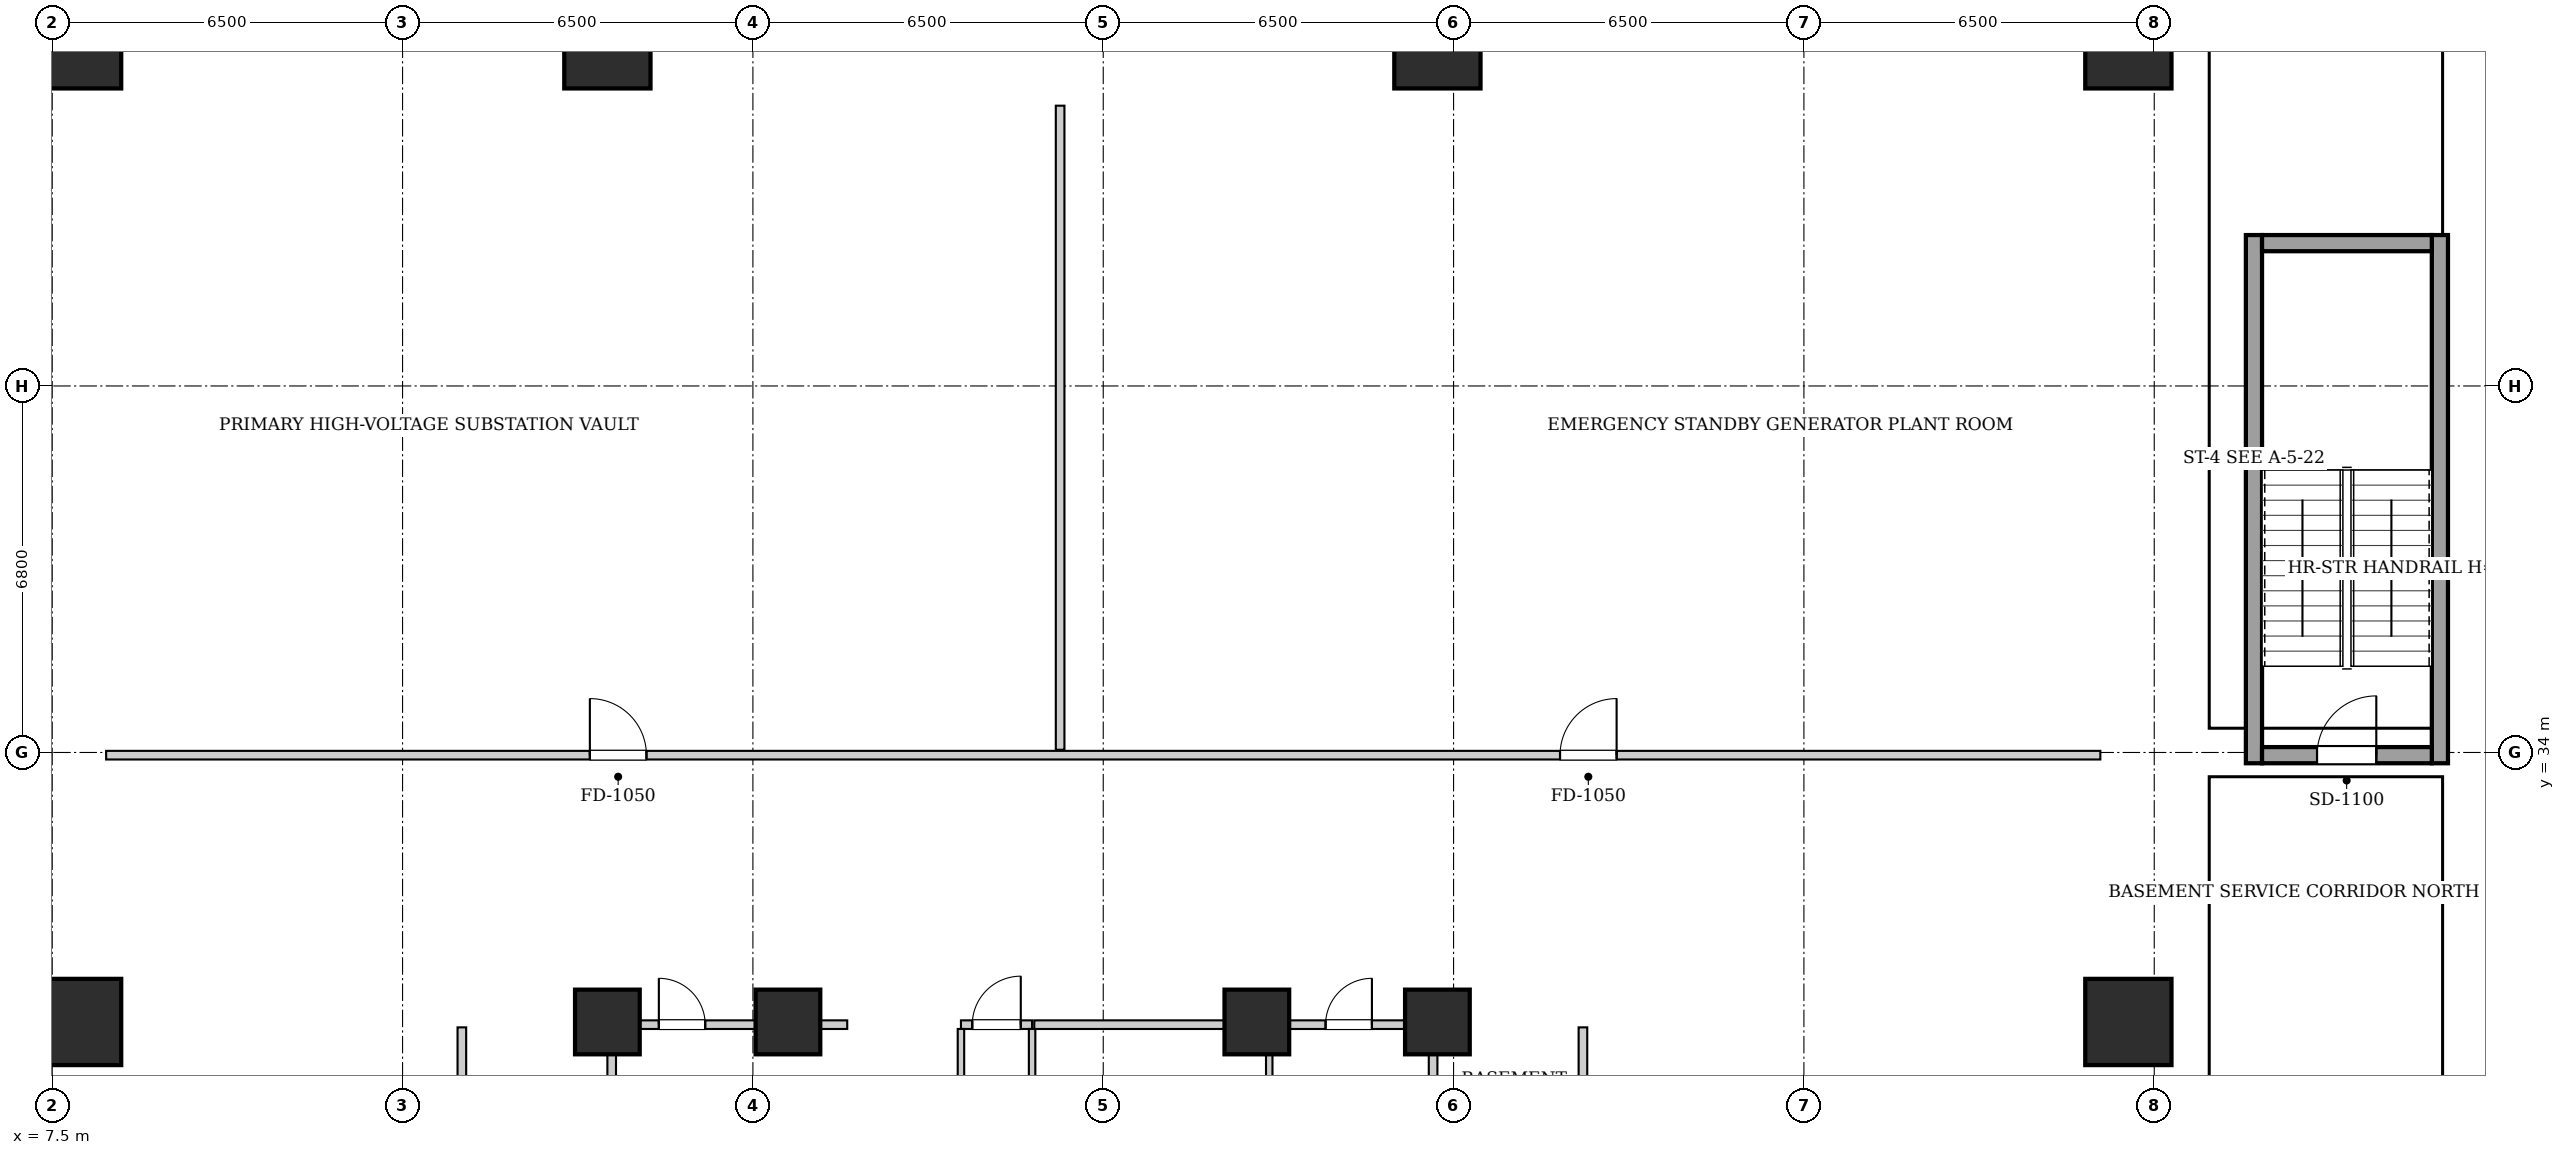
"""IFC4 building model, lengths in metres.
Left out: names, types, materials, properties, quantities, classifications, styles, units other than length and angle.
Written with IfcOpenShell. Run it as: python <this file> out.ifc"""

import sys

from ifc_helpers import new_model, si_unit, direction, frame, frame_2d, origin, origin_2d, place, context, subcontext, project, spatial, rectangle, extrude, element, fill, save


model = new_model("IFC4")
c1 = context("Model", 3, precision=1e-05, world=origin(), true_north=direction((0.0, 1.0)))
c2 = subcontext(c1, "Body", "Model", "MODEL_VIEW")
j1 = project(units=[si_unit("LENGTHUNIT", "METRE"), si_unit("PLANEANGLEUNIT", "RADIAN")], contexts=[c1])
p1 = place(None, origin())
s1 = spatial("IfcSite", under=j1, at=p1, CompositionType="ELEMENT")
p2 = place(p1, origin())
s2 = spatial("IfcBuilding", under=s1, at=p2, CompositionType="ELEMENT")
p3 = place(p2, frame((0.0, 0.0, -9.6)))
s3 = spatial("IfcBuildingStorey", under=s2, at=p3, CompositionType="ELEMENT", Elevation=-9.6)
for number, where, z_axis, x_axis in (
    (1, (7.98, 29.0, 0.0), (0.0, 0.0, 1.0), (1.0, 0.0, 0.0)),
    (2, (7.98, 47.12, 0.0), (0.0, 0.0, 1.0), (1.0, 0.0, 0.0)),
    (3, (46.02, 29.0, 0.0), (0.0, 0.0, 1.0), (1.0, 0.0, 0.0)),
    (4, (46.02, 47.12, 0.0), (0.0, 0.0, 1.0), (1.0, 0.0, 0.0)),
    (5, (17.8, 47.12, 0.0), (0.0, 0.0, 1.0), (1.0, 0.0, 0.0)),
    (6, (33.2, 47.12, 0.0), (0.0, 0.0, 1.0), (1.0, 0.0, 0.0)),
):
    element("IfcColumn", number, at=place(p3, frame(where, z_axis=z_axis, x_axis=x_axis)), inside=s3, PredefinedType="COLUMN", context=c2, shape_type="SweptSolid", body=[
        extrude(rectangle(XDim=1.6, YDim=1.6, at=origin_2d()), origin(), (0.0, 0.0, 1.0), 4.8),
    ])
for number, where, z_axis, x_axis in (
    (7, (17.8, 29.0, 0.0), (0.0, 0.0, 1.0), (1.0, 0.0, 0.0)),
    (8, (21.15, 29.0, 0.0), (0.0, 0.0, 1.0), (1.0, 0.0, 0.0)),
    (9, (29.85, 29.0, 0.0), (0.0, 0.0, 1.0), (1.0, 0.0, 0.0)),
    (10, (33.2, 29.0, 0.0), (0.0, 0.0, 1.0), (1.0, 0.0, 0.0)),
):
    element("IfcColumn", number, at=place(p3, frame(where, z_axis=z_axis, x_axis=x_axis)), inside=s3, PredefinedType="COLUMN", context=c2, shape_type="SweptSolid", body=[
        extrude(rectangle(XDim=1.2, YDim=1.2, at=origin_2d()), origin(), (0.0, 0.0, 1.0), 4.8),
    ])
for number, where, z_axis, x_axis in (
    (11, (48.35, 33.8, 0.0), (0.0, 0.0, 1.0), (0.0, 1.0, 0.0)),
    (12, (51.8, 33.8, 0.0), (0.0, 0.0, 1.0), (0.0, 1.0, 0.0)),
):
    element("IfcWall", number, at=place(p3, frame(where, z_axis=z_axis, x_axis=x_axis)), inside=s3, PredefinedType="SHEAR", context=c2, shape_type="SweptSolid", body=[
        extrude(rectangle(XDim=9.8, YDim=0.3, at=frame_2d((4.9, 0.0))), origin(), (0.0, 0.0, 1.0), 4.48),
    ])
p4 = place(p3, frame((48.5, 43.45, 0.0), z_axis=(0.0, 0.0, 1.0), x_axis=(1.0, 0.0, 0.0)))
e13 = element("IfcWall", 13, at=p4, inside=s3, PredefinedType="SHEAR", context=c2, shape_type="SweptSolid", body=[
    extrude(rectangle(XDim=3.15, YDim=0.3, at=frame_2d((1.575, 0.0))), origin(), (0.0, 0.0, 1.0), 4.48),
])
p5 = place(p3, frame((48.5, 33.95, 0.0), z_axis=(0.0, 0.0, 1.0), x_axis=(1.0, 0.0, 0.0)))
e14 = element("IfcWall", 14, at=p5, inside=s3, PredefinedType="SHEAR", context=c2, shape_type="SweptSolid", body=[
    extrude(rectangle(XDim=3.15, YDim=0.3, at=frame_2d((1.575, 0.0))), origin(), (0.0, 0.0, 1.0), 4.48),
])
p6 = place(p5, frame((1.02, 0.0, 0.0)))
e15 = element("IfcOpeningElement", 15, at=p6, cuts=e14, PredefinedType="OPENING", context=c2, shape_type="SweptSolid", body=[
    extrude(rectangle(XDim=1.1, YDim=2.05, at=frame_2d((0.55, 1.025))), frame((0.0, 0.16, 0.0), z_axis=(0.0, -1.0, 0.0), x_axis=(1.0, 0.0, 0.0)), (0.0, 0.0, 1.0), 0.32),
])
for number, where, z_axis, x_axis in (
    (16, (17.88, 24.12, 0.0), (0.0, 0.0, 1.0), (0.0, 1.0, 0.0)),
    (17, (33.12, 24.12, 0.0), (0.0, 0.0, 1.0), (0.0, 1.0, 0.0)),
):
    element("IfcWall", number, at=place(p3, frame(where, z_axis=z_axis, x_axis=x_axis)), inside=s3, PredefinedType="PARTITIONING", context=c2, shape_type="SweptSolid", body=[
        extrude(rectangle(XDim=4.76, YDim=0.16, at=frame_2d((2.38, 0.0))), origin(), (0.0, 0.0, 1.0), 4.48),
    ])
p7 = place(p3, frame((24.36, 28.95, 0.0), z_axis=(0.0, 0.0, 1.0), x_axis=(1.0, 0.0, 0.0)))
e18 = element("IfcWall", 18, at=p7, inside=s3, PredefinedType="PARTITIONING", context=c2, shape_type="SweptSolid", body=[
    extrude(rectangle(XDim=1.32, YDim=0.16, at=frame_2d((0.66, 0.0))), origin(), (0.0, 0.0, 1.0), 4.48),
])
p8 = place(p7, frame((0.21, 0.0, 0.0)))
e19 = element("IfcOpeningElement", 19, at=p8, cuts=e18, PredefinedType="OPENING", context=c2, shape_type="SweptSolid", body=[
    extrude(rectangle(XDim=0.9, YDim=2.05, at=frame_2d((0.45, 1.025))), frame((0.0, 0.09, 0.0), z_axis=(0.0, -1.0, 0.0), x_axis=(1.0, 0.0, 0.0)), (0.0, 0.0, 1.0), 0.18),
])
p9 = place(p3, frame((17.96, 28.95, 0.0), z_axis=(0.0, 0.0, 1.0), x_axis=(1.0, 0.0, 0.0)))
e20 = element("IfcWall", 20, at=p9, inside=s3, PredefinedType="PARTITIONING", context=c2, shape_type="SweptSolid", body=[
    extrude(rectangle(XDim=4.29, YDim=0.16, at=frame_2d((2.145, 0.0))), origin(), (0.0, 0.0, 1.0), 4.48),
])
p10 = place(p9, frame((0.795, 0.0, 0.0)))
e21 = element("IfcOpeningElement", 21, at=p10, cuts=e20, PredefinedType="OPENING", context=c2, shape_type="SweptSolid", body=[
    extrude(rectangle(XDim=0.86, YDim=2.05, at=frame_2d((0.43, 1.025))), frame((0.0, 0.09, 0.0), z_axis=(0.0, -1.0, 0.0), x_axis=(1.0, 0.0, 0.0)), (0.0, 0.0, 1.0), 0.18),
])
for number, where, z_axis, x_axis in (
    (22, (24.36, 26.6, 0.0), (0.0, 0.0, 1.0), (0.0, 1.0, 0.0)),
    (23, (25.68, 26.6, 0.0), (0.0, 0.0, 1.0), (0.0, 1.0, 0.0)),
):
    element("IfcWall", number, at=place(p3, frame(where, z_axis=z_axis, x_axis=x_axis)), inside=s3, PredefinedType="PARTITIONING", context=c2, shape_type="SweptSolid", body=[
        extrude(rectangle(XDim=2.27, YDim=0.12, at=frame_2d((1.135, 0.0))), origin(), (0.0, 0.0, 1.0), 4.48),
    ])
p11 = place(p3, frame((30.08, 26.18, 0.0), z_axis=(0.0, 0.0, 1.0), x_axis=(0.0, 1.0, 0.0)))
e24 = element("IfcWall", 24, at=p11, inside=s3, PredefinedType="PARTITIONING", context=c2, shape_type="SweptSolid", body=[
    extrude(rectangle(XDim=2.68, YDim=0.12, at=frame_2d((1.34, 0.0))), origin(), (0.0, 0.0, 1.0), 4.48),
])
p12 = place(p3, frame((30.08, 28.95, 0.0), z_axis=(0.0, 0.0, 1.0), x_axis=(1.0, 0.0, 0.0)))
e25 = element("IfcWall", 25, at=p12, inside=s3, PredefinedType="PARTITIONING", context=c2, shape_type="SweptSolid", body=[
    extrude(rectangle(XDim=2.96, YDim=0.16, at=frame_2d((1.48, 0.0))), origin(), (0.0, 0.0, 1.0), 4.48),
])
p13 = place(p12, frame((1.045, 0.0, 0.0)))
e26 = element("IfcOpeningElement", 26, at=p13, cuts=e25, PredefinedType="OPENING", context=c2, shape_type="SweptSolid", body=[
    extrude(rectangle(XDim=0.86, YDim=2.05, at=frame_2d((0.43, 1.025))), frame((0.0, 0.09, 0.0), z_axis=(0.0, -1.0, 0.0), x_axis=(1.0, 0.0, 0.0)), (0.0, 0.0, 1.0), 0.18),
])
p14 = place(p3, frame((25.72, 28.95, 0.0), z_axis=(0.0, 0.0, 1.0), x_axis=(1.0, 0.0, 0.0)))
e27 = element("IfcWall", 27, at=p14, inside=s3, PredefinedType="PARTITIONING", context=c2, shape_type="SweptSolid", body=[
    extrude(rectangle(XDim=4.3, YDim=0.16, at=frame_2d((2.15, 0.0))), origin(), (0.0, 0.0, 1.0), 4.48),
])
p15 = place(p3, frame((8.5, 33.95, 0.0), z_axis=(0.0, 0.0, 1.0), x_axis=(1.0, 0.0, 0.0)))
e28 = element("IfcWall", 28, at=p15, inside=s3, PredefinedType="PARTITIONING", context=c2, shape_type="SweptSolid", body=[
    extrude(rectangle(XDim=37.0, YDim=0.16, at=frame_2d((18.5, 0.0))), origin(), (0.0, 0.0, 1.0), 4.48),
])
p16 = place(p15, frame((8.975, 0.0, 0.0)))
e29 = element("IfcOpeningElement", 29, at=p16, cuts=e28, PredefinedType="OPENING", context=c2, shape_type="SweptSolid", body=[
    extrude(rectangle(XDim=1.05, YDim=2.05, at=frame_2d((0.525, 1.025))), frame((0.0, 0.09, 0.0), z_axis=(0.0, -1.0, 0.0), x_axis=(1.0, 0.0, 0.0)), (0.0, 0.0, 1.0), 0.18),
])
p17 = place(p15, frame((26.975, 0.0, 0.0)))
e30 = element("IfcOpeningElement", 30, at=p17, cuts=e28, PredefinedType="OPENING", context=c2, shape_type="SweptSolid", body=[
    extrude(rectangle(XDim=1.05, YDim=2.05, at=frame_2d((0.525, 1.025))), frame((0.0, 0.09, 0.0), z_axis=(0.0, -1.0, 0.0), x_axis=(1.0, 0.0, 0.0)), (0.0, 0.0, 1.0), 0.18),
])
p18 = place(p3, frame((26.2, 34.05, 0.0), z_axis=(0.0, 0.0, 1.0), x_axis=(0.0, 1.0, 0.0)))
e31 = element("IfcWall", 31, at=p18, inside=s3, PredefinedType="PARTITIONING", context=c2, shape_type="SweptSolid", body=[
    extrude(rectangle(XDim=11.95, YDim=0.16, at=frame_2d((5.975, 0.0))), origin(), (0.0, 0.0, 1.0), 4.48),
])
p19 = place(p3, frame((15.1, 15.1, 0.0), z_axis=(0.0, 0.0, 1.0), x_axis=(0.0, 1.0, 0.0)))
e32 = element("IfcWall", 32, at=p19, inside=s3, PredefinedType="PARTITIONING", context=c2, shape_type="SweptSolid", body=[
    extrude(rectangle(XDim=13.8, YDim=0.16, at=frame_2d((6.9, 0.0))), origin(), (0.0, 0.0, 1.0), 4.48),
])
p20 = place(p19, frame((6.475, 0.0, 0.0)))
e33 = element("IfcOpeningElement", 33, at=p20, cuts=e32, PredefinedType="OPENING", context=c2, shape_type="SweptSolid", body=[
    extrude(rectangle(XDim=1.05, YDim=2.05, at=frame_2d((0.525, 1.025))), frame((0.0, 0.09, 0.0), z_axis=(0.0, -1.0, 0.0), x_axis=(1.0, 0.0, 0.0)), (0.0, 0.0, 1.0), 0.18),
])
p21 = place(p3, frame((35.9, 15.1, 0.0), z_axis=(0.0, 0.0, 1.0), x_axis=(0.0, 1.0, 0.0)))
e34 = element("IfcWall", 34, at=p21, inside=s3, PredefinedType="PARTITIONING", context=c2, shape_type="SweptSolid", body=[
    extrude(rectangle(XDim=13.8, YDim=0.16, at=frame_2d((6.9, 0.0))), origin(), (0.0, 0.0, 1.0), 4.48),
])
p22 = place(p21, frame((6.475, 0.0, 0.0)))
e35 = element("IfcOpeningElement", 35, at=p22, cuts=e34, PredefinedType="OPENING", context=c2, shape_type="SweptSolid", body=[
    extrude(rectangle(XDim=1.05, YDim=2.05, at=frame_2d((0.525, 1.025))), frame((0.0, 0.09, 0.0), z_axis=(0.0, -1.0, 0.0), x_axis=(1.0, 0.0, 0.0)), (0.0, 0.0, 1.0), 0.18),
])
p23 = place(p6, origin())
e36 = element("IfcDoor", 36, at=p23, inside=s3, OperationType="SINGLE_SWING_RIGHT", PredefinedType="DOOR", context=c2, shape_type="SweptSolid", body=[
    extrude(rectangle(XDim=1.1, YDim=2.05, at=frame_2d((0.55, 1.025))), frame((0.0, 0.025, 0.0), z_axis=(0.0, -1.0, 0.0), x_axis=(1.0, 0.0, 0.0)), (0.0, 0.0, 1.0), 0.05),
])
fill(e15, e36)
p24 = place(p8, origin())
e37 = element("IfcDoor", 37, at=p24, inside=s3, OperationType="SINGLE_SWING_RIGHT", PredefinedType="DOOR", context=c2, shape_type="SweptSolid", body=[
    extrude(rectangle(XDim=0.9, YDim=2.05, at=frame_2d((0.45, 1.025))), frame((0.0, 0.025, 0.0), z_axis=(0.0, -1.0, 0.0), x_axis=(1.0, 0.0, 0.0)), (0.0, 0.0, 1.0), 0.05),
])
fill(e19, e37)
p25 = place(p10, origin())
e38 = element("IfcDoor", 38, at=p25, inside=s3, OperationType="SINGLE_SWING_LEFT", PredefinedType="DOOR", context=c2, shape_type="SweptSolid", body=[
    extrude(rectangle(XDim=0.86, YDim=2.05, at=frame_2d((0.43, 1.025))), frame((0.0, 0.025, 0.0), z_axis=(0.0, -1.0, 0.0), x_axis=(1.0, 0.0, 0.0)), (0.0, 0.0, 1.0), 0.05),
])
fill(e21, e38)
p26 = place(p13, origin())
e39 = element("IfcDoor", 39, at=p26, inside=s3, OperationType="SINGLE_SWING_RIGHT", PredefinedType="DOOR", context=c2, shape_type="SweptSolid", body=[
    extrude(rectangle(XDim=0.86, YDim=2.05, at=frame_2d((0.43, 1.025))), frame((0.0, 0.025, 0.0), z_axis=(0.0, -1.0, 0.0), x_axis=(1.0, 0.0, 0.0)), (0.0, 0.0, 1.0), 0.05),
])
fill(e26, e39)
p27 = place(p16, origin())
e40 = element("IfcDoor", 40, at=p27, inside=s3, OperationType="SINGLE_SWING_LEFT", PredefinedType="DOOR", context=c2, shape_type="SweptSolid", body=[
    extrude(rectangle(XDim=1.05, YDim=2.05, at=frame_2d((0.525, 1.025))), frame((0.0, 0.025, 0.0), z_axis=(0.0, -1.0, 0.0), x_axis=(1.0, 0.0, 0.0)), (0.0, 0.0, 1.0), 0.05),
])
fill(e29, e40)
p28 = place(p17, origin())
e41 = element("IfcDoor", 41, at=p28, inside=s3, OperationType="SINGLE_SWING_RIGHT", PredefinedType="DOOR", context=c2, shape_type="SweptSolid", body=[
    extrude(rectangle(XDim=1.05, YDim=2.05, at=frame_2d((0.525, 1.025))), frame((0.0, 0.025, 0.0), z_axis=(0.0, -1.0, 0.0), x_axis=(1.0, 0.0, 0.0)), (0.0, 0.0, 1.0), 0.05),
])
fill(e30, e41)
save(model, sys.argv[1])
